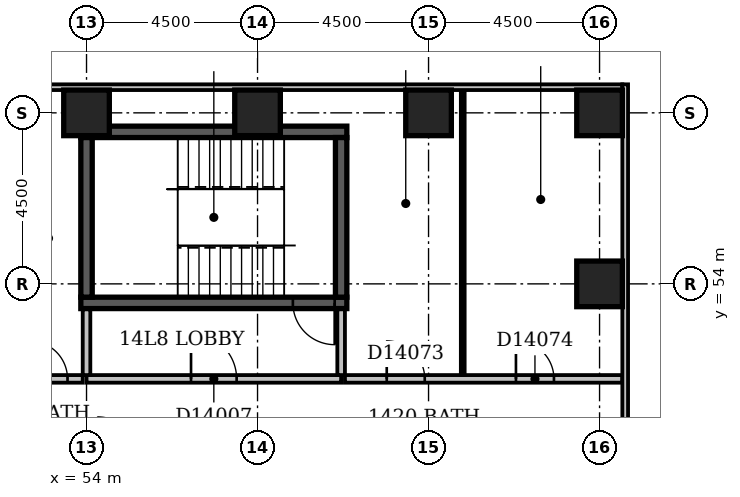
"""IFC4 building model, lengths in metres.
Left out: names, types, materials, properties, quantities, classifications, styles, units other than length and angle.
Written with IfcOpenShell. Run it as: python <this file> out.ifc"""

import sys

from ifc_helpers import new_model, si_unit, direction, frame, frame_2d, origin, origin_2d, place, context, subcontext, project, spatial, rectangle, extrude, element, fill, save


model = new_model("IFC4")
c1 = context("Model", 3, precision=1e-05, world=origin(), true_north=direction((0.0, 1.0)))
c2 = subcontext(c1, "Body", "Model", "MODEL_VIEW")
j1 = project(units=[si_unit("LENGTHUNIT", "METRE"), si_unit("PLANEANGLEUNIT", "RADIAN")], contexts=[c1])
p1 = place(None, origin())
s1 = spatial("IfcSite", under=j1, at=p1, CompositionType="ELEMENT")
p2 = place(p1, origin())
s2 = spatial("IfcBuilding", under=s1, at=p2, CompositionType="ELEMENT")
p3 = place(p2, frame((0.0, 0.0, 61.4)))
s3 = spatial("IfcBuildingStorey", under=s2, at=p3, CompositionType="ELEMENT", Elevation=61.4)
p4 = place(p3, frame((53.85, 53.5, -0.3), z_axis=(0.0, 0.0, 1.0), x_axis=(1.0, 0.0, 0.0)))
e1 = element("IfcWall", 1, at=p4, inside=s3, PredefinedType="SHEAR", context=c2, shape_type="SweptSolid", body=[
    extrude(rectangle(XDim=7.0, YDim=0.3, at=frame_2d((3.5, 0.0))), origin(), (0.0, 0.0, 1.0), 3.6),
])
p5 = place(p4, frame((5.58, 0.0, 0.3)))
e2 = element("IfcOpeningElement", 2, at=p5, cuts=e1, PredefinedType="OPENING", context=c2, shape_type="SweptSolid", body=[
    extrude(rectangle(XDim=1.1, YDim=2.1, at=frame_2d((0.55, 1.05))), frame((0.0, 0.162, 0.0), z_axis=(0.0, -1.0, 0.0), x_axis=(1.0, 0.0, 0.0)), (0.0, 0.0, 1.0), 0.324),
])
p6 = place(p3, frame((53.85, 58.0, -0.3), z_axis=(0.0, 0.0, 1.0), x_axis=(1.0, 0.0, 0.0)))
e3 = element("IfcWall", 3, at=p6, inside=s3, PredefinedType="SHEAR", context=c2, shape_type="SweptSolid", body=[
    extrude(rectangle(XDim=7.0, YDim=0.3, at=frame_2d((3.5, 0.0))), origin(), (0.0, 0.0, 1.0), 3.6),
])
for number, where, z_axis, x_axis in (
    (4, (54.0, 53.65, -0.3), (0.0, 0.0, 1.0), (0.0, 1.0, 0.0)),
    (5, (60.7, 53.65, -0.3), (0.0, 0.0, 1.0), (0.0, 1.0, 0.0)),
):
    element("IfcWall", number, at=place(p3, frame(where, z_axis=z_axis, x_axis=x_axis)), inside=s3, PredefinedType="SHEAR", context=c2, shape_type="SweptSolid", body=[
        extrude(rectangle(XDim=4.2, YDim=0.3, at=frame_2d((2.1, 0.0))), origin(), (0.0, 0.0, 1.0), 3.6),
    ])
for number, where, z_axis, x_axis in (
    (6, (67.5, 54.0, -0.3), (0.0, 0.0, 1.0), (1.0, 0.0, 0.0)),
    (7, (54.0, 58.5, -0.3), (0.0, 0.0, 1.0), (1.0, 0.0, 0.0)),
    (8, (58.5, 58.5, -0.3), (0.0, 0.0, 1.0), (1.0, 0.0, 0.0)),
    (9, (63.0, 58.5, -0.3), (0.0, 0.0, 1.0), (1.0, 0.0, 0.0)),
    (10, (67.5, 58.5, -0.3), (0.0, 0.0, 1.0), (1.0, 0.0, 0.0)),
):
    element("IfcColumn", number, at=place(p3, frame(where, z_axis=z_axis, x_axis=x_axis)), inside=s3, PredefinedType="COLUMN", context=c2, shape_type="SweptSolid", body=[
        extrude(rectangle(XDim=1.2, YDim=1.2, at=origin_2d()), origin(), (0.0, 0.0, 1.0), 3.6),
    ])
p7 = place(p3, frame((68.175, 35.4, 0.0), z_axis=(0.0, 0.0, 1.0), x_axis=(0.0, 1.0, 0.0)))
e11 = element("IfcWall", 11, at=p7, inside=s3, PredefinedType="STANDARD", context=c2, shape_type="SweptSolid", body=[
    extrude(rectangle(XDim=23.85, YDim=0.15, at=frame_2d((11.925, 0.0))), origin(), (0.0, 0.0, 1.0), 2.7),
])
p8 = place(p7, frame((1.65, 0.0, 0.6)))
e12 = element("IfcOpeningElement", 12, at=p8, cuts=e11, PredefinedType="OPENING", context=c2, shape_type="SweptSolid", body=[
    extrude(rectangle(XDim=2.4, YDim=1.8, at=frame_2d((1.2, 0.9))), frame((0.0, 0.087, 0.0), z_axis=(0.0, -1.0, 0.0), x_axis=(1.0, 0.0, 0.0)), (0.0, 0.0, 1.0), 0.174),
])
p9 = place(p7, frame((6.03, 0.0, 0.6)))
e13 = element("IfcOpeningElement", 13, at=p9, cuts=e11, PredefinedType="OPENING", context=c2, shape_type="SweptSolid", body=[
    extrude(rectangle(XDim=1.5, YDim=1.8, at=frame_2d((0.75, 0.9))), frame((0.0, 0.087, 0.0), z_axis=(0.0, -1.0, 0.0), x_axis=(1.0, 0.0, 0.0)), (0.0, 0.0, 1.0), 0.174),
])
p10 = place(p3, frame((68.1, 59.175, 0.0), z_axis=(0.0, 0.0, 1.0), x_axis=(-1.0, 0.0, 0.0)))
e14 = element("IfcWall", 14, at=p10, inside=s3, PredefinedType="STANDARD", context=c2, shape_type="SweptSolid", body=[
    extrude(rectangle(XDim=68.85, YDim=0.15, at=frame_2d((34.425, 0.0))), origin(), (0.0, 0.0, 1.0), 2.7),
])
p11 = place(p10, frame((37.65, 0.0, 0.6)))
e15 = element("IfcOpeningElement", 15, at=p11, cuts=e14, PredefinedType="OPENING", context=c2, shape_type="SweptSolid", body=[
    extrude(rectangle(XDim=2.4, YDim=1.8, at=frame_2d((1.2, 0.9))), frame((0.0, 0.087, 0.0), z_axis=(0.0, -1.0, 0.0), x_axis=(1.0, 0.0, 0.0)), (0.0, 0.0, 1.0), 0.174),
])
p12 = place(p3, frame((54.0, 51.5, 0.0), z_axis=(0.0, 0.0, 1.0), x_axis=(1.0, 0.0, 0.0)))
e16 = element("IfcWall", 16, at=p12, inside=s3, PredefinedType="PARTITIONING", context=c2, shape_type="SweptSolid", body=[
    extrude(rectangle(XDim=6.7, YDim=0.2, at=frame_2d((3.35, 0.0))), origin(), (0.0, 0.0, 1.0), 3.3),
])
p13 = place(p12, frame((2.75, 0.0, 0.0)))
e17 = element("IfcOpeningElement", 17, at=p13, cuts=e16, PredefinedType="OPENING", context=c2, shape_type="SweptSolid", body=[
    extrude(rectangle(XDim=1.2, YDim=2.1, at=frame_2d((0.6, 1.05))), frame((0.0, 0.112, 0.0), z_axis=(0.0, -1.0, 0.0), x_axis=(1.0, 0.0, 0.0)), (0.0, 0.0, 1.0), 0.224),
])
p14 = place(p3, frame((60.7, 51.6, 0.0), z_axis=(0.0, 0.0, 1.0), x_axis=(0.0, 1.0, 0.0)))
e18 = element("IfcWall", 18, at=p14, inside=s3, PredefinedType="PARTITIONING", context=c2, shape_type="SweptSolid", body=[
    extrude(rectangle(XDim=1.73, YDim=0.2, at=frame_2d((0.865, 0.0))), origin(), (0.0, 0.0, 1.0), 3.3),
])
p15 = place(p3, frame((54.0, 51.6, 0.0), z_axis=(0.0, 0.0, 1.0), x_axis=(0.0, 1.0, 0.0)))
e19 = element("IfcWall", 19, at=p15, inside=s3, PredefinedType="PARTITIONING", context=c2, shape_type="SweptSolid", body=[
    extrude(rectangle(XDim=1.73, YDim=0.2, at=frame_2d((0.865, 0.0))), origin(), (0.0, 0.0, 1.0), 2.6),
])
p16 = place(p3, frame((52.1, 51.5, 0.0), z_axis=(0.0, 0.0, 1.0), x_axis=(1.0, 0.0, 0.0)))
e20 = element("IfcWall", 20, at=p16, inside=s3, PredefinedType="PARTITIONING", context=c2, shape_type="SweptSolid", body=[
    extrude(rectangle(XDim=1.8, YDim=0.2, at=frame_2d((0.9, 0.0))), origin(), (0.0, 0.0, 1.0), 3.3),
])
p17 = place(p16, frame((0.4, 0.0, 0.0)))
e21 = element("IfcOpeningElement", 21, at=p17, cuts=e20, PredefinedType="OPENING", context=c2, shape_type="SweptSolid", body=[
    extrude(rectangle(XDim=1.0, YDim=2.1, at=frame_2d((0.5, 1.05))), frame((0.0, 0.112, 0.0), z_axis=(0.0, -1.0, 0.0), x_axis=(1.0, 0.0, 0.0)), (0.0, 0.0, 1.0), 0.224),
])
p18 = place(p3, frame((60.8, 51.5, 0.0), z_axis=(0.0, 0.0, 1.0), x_axis=(1.0, 0.0, 0.0)))
e22 = element("IfcWall", 22, at=p18, inside=s3, PredefinedType="PARTITIONING", context=c2, shape_type="SweptSolid", body=[
    extrude(rectangle(XDim=7.3, YDim=0.2, at=frame_2d((3.65, 0.0))), origin(), (0.0, 0.0, 1.0), 3.3),
])
p19 = place(p18, frame((1.1, 0.0, 0.0)))
e23 = element("IfcOpeningElement", 23, at=p19, cuts=e22, PredefinedType="OPENING", context=c2, shape_type="SweptSolid", body=[
    extrude(rectangle(XDim=1.0, YDim=2.1, at=frame_2d((0.5, 1.05))), frame((0.0, 0.112, 0.0), z_axis=(0.0, -1.0, 0.0), x_axis=(1.0, 0.0, 0.0)), (0.0, 0.0, 1.0), 0.224),
])
p20 = place(p18, frame((4.5, 0.0, 0.0)))
e24 = element("IfcOpeningElement", 24, at=p20, cuts=e22, PredefinedType="OPENING", context=c2, shape_type="SweptSolid", body=[
    extrude(rectangle(XDim=1.0, YDim=2.1, at=frame_2d((0.5, 1.05))), frame((0.0, 0.112, 0.0), z_axis=(0.0, -1.0, 0.0), x_axis=(1.0, 0.0, 0.0)), (0.0, 0.0, 1.0), 0.224),
])
p21 = place(p3, frame((63.9, 51.6, 0.0), z_axis=(0.0, 0.0, 1.0), x_axis=(0.0, 1.0, 0.0)))
e25 = element("IfcWall", 25, at=p21, inside=s3, PredefinedType="PARTITIONING", context=c2, shape_type="SweptSolid", body=[
    extrude(rectangle(XDim=7.5, YDim=0.1, at=frame_2d((3.75, 0.0))), origin(), (0.0, 0.0, 1.0), 3.3),
])
p22 = place(p13, origin())
e26 = element("IfcDoor", 26, at=p22, inside=s3, OperationType="SINGLE_SWING_LEFT", PredefinedType="DOOR", context=c2, shape_type="SweptSolid", body=[
    extrude(rectangle(XDim=1.2, YDim=2.1, at=frame_2d((0.6, 1.05))), frame((0.0, 0.025, 0.0), z_axis=(0.0, -1.0, 0.0), x_axis=(1.0, 0.0, 0.0)), (0.0, 0.0, 1.0), 0.05),
])
fill(e17, e26)
p23 = place(p5, origin())
e27 = element("IfcDoor", 27, at=p23, inside=s3, OperationType="SINGLE_SWING_RIGHT", PredefinedType="DOOR", context=c2, shape_type="SweptSolid", body=[
    extrude(rectangle(XDim=1.1, YDim=2.1, at=frame_2d((0.55, 1.05))), frame((0.0, 0.025, 0.0), z_axis=(0.0, -1.0, 0.0), x_axis=(1.0, 0.0, 0.0)), (0.0, 0.0, 1.0), 0.05),
])
fill(e2, e27)
p24 = place(p17, origin())
e28 = element("IfcDoor", 28, at=p24, inside=s3, OperationType="SINGLE_SWING_LEFT", PredefinedType="DOOR", context=c2, shape_type="SweptSolid", body=[
    extrude(rectangle(XDim=1.0, YDim=2.1, at=frame_2d((0.5, 1.05))), frame((0.0, 0.025, 0.0), z_axis=(0.0, -1.0, 0.0), x_axis=(1.0, 0.0, 0.0)), (0.0, 0.0, 1.0), 0.05),
])
fill(e21, e28)
p25 = place(p19, origin())
e29 = element("IfcDoor", 29, at=p25, inside=s3, OperationType="SINGLE_SWING_LEFT", PredefinedType="DOOR", context=c2, shape_type="SweptSolid", body=[
    extrude(rectangle(XDim=1.0, YDim=2.1, at=frame_2d((0.5, 1.05))), frame((0.0, 0.025, 0.0), z_axis=(0.0, -1.0, 0.0), x_axis=(1.0, 0.0, 0.0)), (0.0, 0.0, 1.0), 0.05),
])
fill(e23, e29)
p26 = place(p20, origin())
e30 = element("IfcDoor", 30, at=p26, inside=s3, OperationType="SINGLE_SWING_LEFT", PredefinedType="DOOR", context=c2, shape_type="SweptSolid", body=[
    extrude(rectangle(XDim=1.0, YDim=2.1, at=frame_2d((0.5, 1.05))), frame((0.0, 0.025, 0.0), z_axis=(0.0, -1.0, 0.0), x_axis=(1.0, 0.0, 0.0)), (0.0, 0.0, 1.0), 0.05),
])
fill(e24, e30)
save(model, sys.argv[1])
